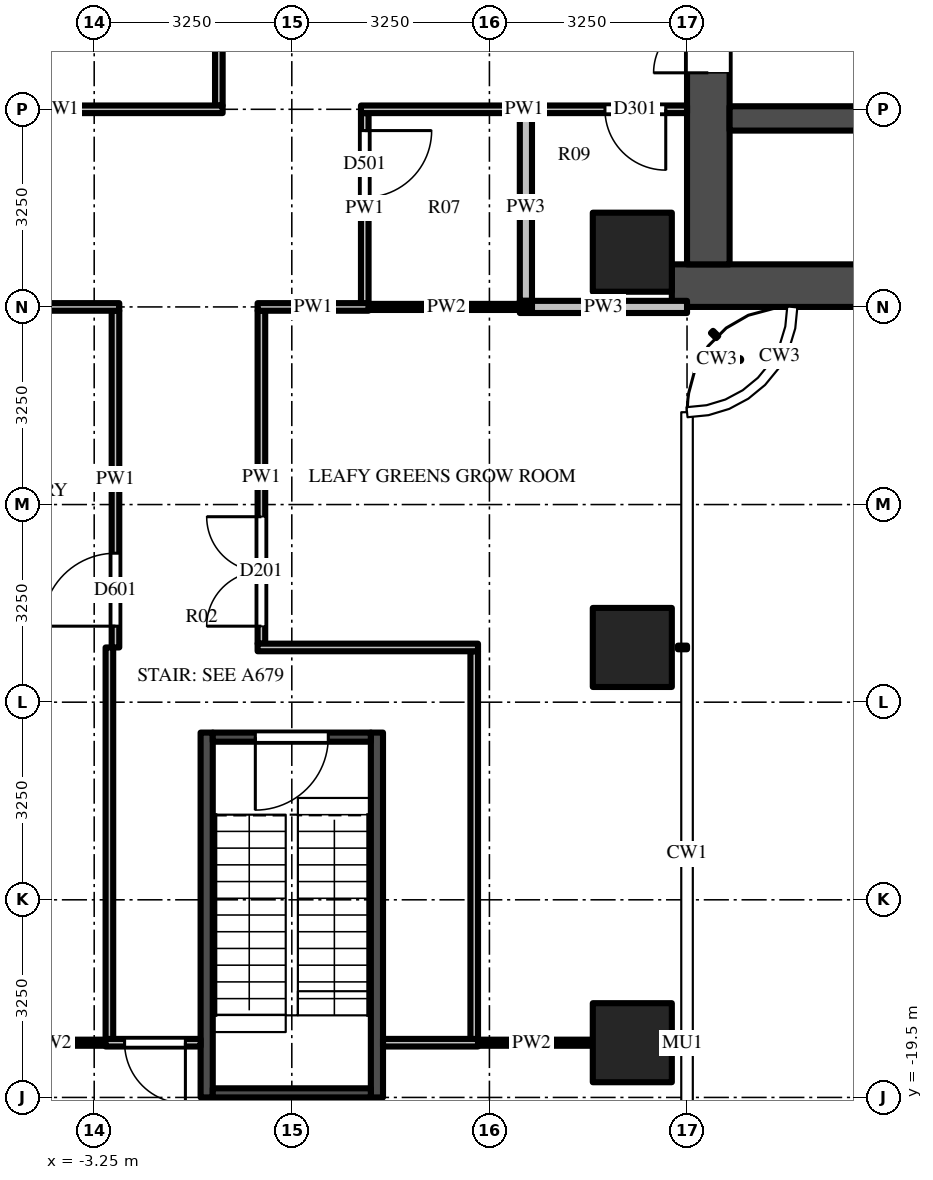
"""IFC4 building model, lengths in metres.
Left out: names, types, materials, properties, quantities, classifications, styles, units other than length and angle.
Written with IfcOpenShell. Run it as: python <this file> out.ifc"""

import sys

from ifc_helpers import new_model, si_unit, direction, frame, frame_2d, origin, origin_2d, place, context, subcontext, project, spatial, rectangle, extrude, source, transform, mapped, element, fill, save


model = new_model("IFC4")
c1 = context("Model", 3, precision=1e-05, world=origin(), true_north=direction((0.0, 1.0)))
c2 = subcontext(c1, "Body", "Model", "MODEL_VIEW")
j1 = project(units=[si_unit("LENGTHUNIT", "METRE"), si_unit("PLANEANGLEUNIT", "RADIAN")], contexts=[c1])
p1 = place(None, origin())
s1 = spatial("IfcSite", under=j1, at=p1, CompositionType="ELEMENT")
p2 = place(p1, origin())
s2 = spatial("IfcBuilding", under=s1, at=p2, CompositionType="ELEMENT")
p3 = place(p2, frame((0.0, 0.0, 129.0)))
s3 = spatial("IfcBuildingStorey", under=s2, at=p3, CompositionType="ELEMENT", Elevation=129.0)
m1 = source(origin(), c2, "Body", "SweptSolid", [
    extrude(rectangle(XDim=1.3, YDim=1.3, at=origin_2d()), origin(), (0.0, 0.0, 1.0), 4.5),
])
for number, where, z_axis, x_axis in (
    (1, (5.6, -5.6, 0.0), (0.0, 0.0, 1.0), (1.0, 0.0, 0.0)),
    (2, (5.6, -12.1, 0.0), (0.0, 0.0, 1.0), (1.0, 0.0, 0.0)),
    (3, (5.6, -18.6, 0.0), (0.0, 0.0, 1.0), (1.0, 0.0, 0.0)),
):
    element("IfcColumn", number, at=place(p3, frame(where, z_axis=z_axis, x_axis=x_axis)), inside=s3, PredefinedType="COLUMN", context=c2, shape_type="MappedRepresentation", body=[
        mapped(m1, transform((0.0, 0.0, 0.0))),
    ])
m2 = source(origin(), c2, "Body", "SweptSolid", [
    extrude(rectangle(XDim=16.5, YDim=0.7, at=frame_2d((8.25, 0.0))), origin(), (0.0, 0.0, 1.0), 4.25),
])
p4 = place(p3, frame((6.25, -6.15, 0.0), z_axis=(0.0, 0.0, 1.0), x_axis=(1.0, 0.0, 0.0)))
e4 = element("IfcWall", 4, at=p4, inside=s3, PredefinedType="SHEAR", context=c2, shape_type="MappedRepresentation", body=[
    mapped(m2, transform((0.0, 0.0, 0.0))),
])
m3 = source(origin(), c2, "Body", "SweptSolid", [
    extrude(rectangle(XDim=9.05, YDim=0.7, at=frame_2d((4.525, 0.0))), origin(), (0.0, 0.0, 1.0), 4.25),
])
p5 = place(p3, frame((6.85, -5.8, 0.0), z_axis=(0.0, 0.0, 1.0), x_axis=(0.0, 1.0, 0.0)))
e5 = element("IfcWall", 5, at=p5, inside=s3, PredefinedType="SHEAR", context=c2, shape_type="MappedRepresentation", body=[
    mapped(m3, transform((0.0, 0.0, 0.0))),
])
m4 = source(origin(), c2, "Body", "SweptSolid", [
    extrude(rectangle(XDim=1.8, YDim=2.1, at=frame_2d((0.9, 1.05))), frame((0.0, 0.36, 0.0), z_axis=(0.0, -1.0, 0.0), x_axis=(1.0, 0.0, 0.0)), (0.0, 0.0, 1.0), 0.72),
])
p6 = place(p5, frame((3.15, 0.0, 0.0)))
e6 = element("IfcOpeningElement", 6, at=p6, cuts=e5, PredefinedType="OPENING", context=c2, shape_type="MappedRepresentation", body=[
    mapped(m4, transform((0.0, 0.0, 0.0))),
])
m5 = source(origin(), c2, "Body", "SweptSolid", [
    extrude(rectangle(XDim=7.5, YDim=0.4, at=frame_2d((3.75, 0.0))), origin(), (0.0, 0.0, 1.0), 4.25),
])
p7 = place(p3, frame((7.2, -3.4, 0.0), z_axis=(0.0, 0.0, 1.0), x_axis=(1.0, 0.0, 0.0)))
e7 = element("IfcWall", 7, at=p7, inside=s3, PredefinedType="SHEAR", context=c2, shape_type="MappedRepresentation", body=[
    mapped(m5, transform((0.0, 0.0, 0.0))),
])
m6 = source(origin(), c2, "Body", "SweptSolid", [
    extrude(rectangle(XDim=1.1, YDim=2.1, at=frame_2d((0.55, 1.05))), frame((0.0, 0.21, 0.0), z_axis=(0.0, -1.0, 0.0), x_axis=(1.0, 0.0, 0.0)), (0.0, 0.0, 1.0), 0.42),
])
p8 = place(p7, frame((3.0, 0.0, 0.0)))
e8 = element("IfcOpeningElement", 8, at=p8, cuts=e7, PredefinedType="OPENING", context=c2, shape_type="MappedRepresentation", body=[
    mapped(m6, transform((0.0, 0.0, 0.0))),
])
p9 = place(p7, frame((5.5, 0.0, 0.0)))
e9 = element("IfcOpeningElement", 9, at=p9, cuts=e7, PredefinedType="OPENING", context=c2, shape_type="MappedRepresentation", body=[
    mapped(m6, transform((0.0, 0.0, 0.0))),
])
m7 = source(origin(), c2, "Body", "SweptSolid", [
    extrude(rectangle(XDim=6.0, YDim=0.2, at=frame_2d((3.0, 0.0))), origin(), (0.0, 0.0, 1.0), 4.25),
])
for number, where, z_axis, x_axis in (
    (10, (1.4, -13.5, 0.0), (0.0, 0.0, 1.0), (0.0, -1.0, 0.0)),
    (11, (-1.4, -13.5, 0.0), (0.0, 0.0, 1.0), (0.0, -1.0, 0.0)),
):
    element("IfcWall", number, at=place(p3, frame(where, z_axis=z_axis, x_axis=x_axis)), inside=s3, PredefinedType="SHEAR", context=c2, shape_type="MappedRepresentation", body=[
        mapped(m7, transform((0.0, 0.0, 0.0))),
    ])
m8 = source(origin(), c2, "Body", "SweptSolid", [
    extrude(rectangle(XDim=2.6, YDim=0.15, at=frame_2d((1.3, 0.0))), origin(), (0.0, 0.0, 1.0), 4.25),
])
p10 = place(p3, frame((1.3, -13.575, 0.0), z_axis=(0.0, 0.0, 1.0), x_axis=(-1.0, 0.0, 0.0)))
e12 = element("IfcWall", 12, at=p10, inside=s3, PredefinedType="SHEAR", context=c2, shape_type="MappedRepresentation", body=[
    mapped(m8, transform((0.0, 0.0, 0.0))),
])
m9 = source(origin(), c2, "Body", "SweptSolid", [
    extrude(rectangle(XDim=1.2, YDim=2.1, at=frame_2d((0.6, 1.05))), frame((0.0, 0.085, 0.0), z_axis=(0.0, -1.0, 0.0), x_axis=(1.0, 0.0, 0.0)), (0.0, 0.0, 1.0), 0.17),
])
p11 = place(p10, frame((0.7, 0.0, 0.0)))
e13 = element("IfcOpeningElement", 13, at=p11, cuts=e12, PredefinedType="OPENING", context=c2, shape_type="MappedRepresentation", body=[
    mapped(m9, transform((0.0, 0.0, 0.0))),
])
p12 = place(p3, frame((1.3, -19.425, 0.0), z_axis=(0.0, 0.0, 1.0), x_axis=(-1.0, 0.0, 0.0)))
e14 = element("IfcWall", 14, at=p12, inside=s3, PredefinedType="SHEAR", context=c2, shape_type="MappedRepresentation", body=[
    mapped(m8, transform((0.0, 0.0, 0.0))),
])
m10 = source(origin(), c2, "Body", "SweptSolid", [
    extrude(rectangle(XDim=6.45, YDim=0.125, at=frame_2d((3.225, 0.0))), origin(), (0.0, 0.0, 1.0), 3.468),
])
p13 = place(p3, frame((-3.0, -18.55, 0.0), z_axis=(0.0, 0.0, 1.0), x_axis=(0.0, 1.0, 0.0)))
e15 = element("IfcWall", 15, at=p13, inside=s3, PredefinedType="PARTITIONING", context=c2, shape_type="MappedRepresentation", body=[
    mapped(m10, transform((0.0, 0.0, 0.0))),
])
m11 = source(origin(), c2, "Body", "SweptSolid", [
    extrude(rectangle(XDim=5.538, YDim=0.125, at=frame_2d((2.769, 0.0))), origin(), (0.0, 0.0, 1.0), 3.468),
])
p14 = place(p3, frame((-2.9, -12.1, 0.0), z_axis=(0.0, 0.0, 1.0), x_axis=(0.0, 1.0, 0.0)))
e16 = element("IfcWall", 16, at=p14, inside=s3, PredefinedType="PARTITIONING", context=c2, shape_type="MappedRepresentation", body=[
    mapped(m11, transform((0.0, 0.0, 0.0))),
])
m12 = source(origin(), c2, "Body", "SweptSolid", [
    extrude(rectangle(XDim=1.2, YDim=2.1, at=frame_2d((0.6, 1.05))), frame((0.0, 0.073, 0.0), z_axis=(0.0, -1.0, 0.0), x_axis=(1.0, 0.0, 0.0)), (0.0, 0.0, 1.0), 0.145),
])
p15 = place(p14, frame((0.35, 0.0, 0.0)))
e17 = element("IfcOpeningElement", 17, at=p15, cuts=e16, PredefinedType="OPENING", context=c2, shape_type="MappedRepresentation", body=[
    mapped(m12, transform((0.0, 0.0, 0.0))),
])
m13 = source(origin(), c2, "Body", "SweptSolid", [
    extrude(rectangle(XDim=3.125, YDim=0.125, at=frame_2d((1.562, 0.0))), origin(), (0.0, 0.0, 1.0), 3.546),
])
p16 = place(p3, frame((-1.2, -0.062, 0.0), z_axis=(0.0, 0.0, 1.0), x_axis=(0.0, -1.0, 0.0)))
e18 = element("IfcWall", 18, at=p16, inside=s3, PredefinedType="PARTITIONING", context=c2, shape_type="MappedRepresentation", body=[
    mapped(m13, transform((0.0, 0.0, 0.0))),
])
m14 = source(origin(), c2, "Body", "SweptSolid", [
    extrude(rectangle(XDim=5.475, YDim=0.125, at=frame_2d((2.738, 0.0))), origin(), (0.0, 0.0, 1.0), 3.468),
])
p17 = place(p3, frame((-0.5, -12.038, 0.0), z_axis=(0.0, 0.0, 1.0), x_axis=(0.0, 1.0, 0.0)))
e19 = element("IfcWall", 19, at=p17, inside=s3, PredefinedType="PARTITIONING", context=c2, shape_type="MappedRepresentation", body=[
    mapped(m14, transform((0.0, 0.0, 0.0))),
])
m15 = source(origin(), c2, "Body", "SweptSolid", [
    extrude(rectangle(XDim=1.8, YDim=2.1, at=frame_2d((0.9, 1.05))), frame((0.0, 0.073, 0.0), z_axis=(0.0, -1.0, 0.0), x_axis=(1.0, 0.0, 0.0)), (0.0, 0.0, 1.0), 0.145),
])
p18 = place(p17, frame((0.288, 0.0, 0.0)))
e20 = element("IfcOpeningElement", 20, at=p18, cuts=e19, PredefinedType="OPENING", context=c2, shape_type="MappedRepresentation", body=[
    mapped(m15, transform((0.0, 0.0, 0.0))),
])
m16 = source(origin(), c2, "Body", "SweptSolid", [
    extrude(rectangle(XDim=3.137, YDim=0.125, at=frame_2d((1.569, 0.0))), origin(), (0.0, 0.0, 1.0), 3.468),
])
p19 = place(p3, frame((1.2, -3.312, 0.0), z_axis=(0.0, 0.0, 1.0), x_axis=(0.0, -1.0, 0.0)))
e21 = element("IfcWall", 21, at=p19, inside=s3, PredefinedType="PARTITIONING", context=c2, shape_type="MappedRepresentation", body=[
    mapped(m16, transform((0.0, 0.0, 0.0))),
])
m17 = source(origin(), c2, "Body", "SweptSolid", [
    extrude(rectangle(XDim=1.1, YDim=2.1, at=frame_2d((0.55, 1.05))), frame((0.0, 0.073, 0.0), z_axis=(0.0, -1.0, 0.0), x_axis=(1.0, 0.0, 0.0)), (0.0, 0.0, 1.0), 0.145),
])
p20 = place(p19, frame((0.288, 0.0, 0.0)))
e22 = element("IfcOpeningElement", 22, at=p20, cuts=e21, PredefinedType="OPENING", context=c2, shape_type="MappedRepresentation", body=[
    mapped(m17, transform((0.0, 0.0, 0.0))),
])
m18 = source(origin(), c2, "Body", "SweptSolid", [
    extrude(rectangle(XDim=6.387, YDim=0.125, at=frame_2d((3.194, 0.0))), origin(), (0.0, 0.0, 1.0), 3.468),
])
p21 = place(p3, frame((3.0, -12.163, 0.0), z_axis=(0.0, 0.0, 1.0), x_axis=(0.0, -1.0, 0.0)))
e23 = element("IfcWall", 23, at=p21, inside=s3, PredefinedType="PARTITIONING", context=c2, shape_type="MappedRepresentation", body=[
    mapped(m18, transform((0.0, 0.0, 0.0))),
])
m19 = source(origin(), c2, "Body", "SweptSolid", [
    extrude(rectangle(XDim=3.087, YDim=0.2, at=frame_2d((1.544, 0.0))), origin(), (0.0, 0.0, 1.0), 3.468),
])
p22 = place(p3, frame((3.85, -6.4, 0.0), z_axis=(0.0, 0.0, 1.0), x_axis=(0.0, 1.0, 0.0)))
e24 = element("IfcWall", 24, at=p22, inside=s3, PredefinedType="PARTITIONING", context=c2, shape_type="MappedRepresentation", body=[
    mapped(m19, transform((0.0, 0.0, 0.0))),
])
m20 = source(origin(), c2, "Body", "SweptSolid", [
    extrude(rectangle(XDim=2.012, YDim=0.1, at=frame_2d((1.006, 0.0))), origin(), (0.0, 0.0, 1.0), 3.697),
])
for number, where, z_axis, x_axis in (
    (25, (-4.95, -18.6, 0.0), (0.0, 0.0, 1.0), (1.0, 0.0, 0.0)),
    (26, (2.938, -18.6, 0.0), (0.0, 0.0, 1.0), (1.0, 0.0, 0.0)),
):
    element("IfcWall", number, at=place(p3, frame(where, z_axis=z_axis, x_axis=x_axis)), inside=s3, PredefinedType="PARTITIONING", context=c2, shape_type="MappedRepresentation", body=[
        mapped(m20, transform((0.0, 0.0, 0.0))),
    ])
m21 = source(origin(), c2, "Body", "SweptSolid", [
    extrude(rectangle(XDim=1.562, YDim=0.125, at=frame_2d((0.781, 0.0))), origin(), (0.0, 0.0, 1.0), 3.697),
])
p23 = place(p3, frame((-1.5, -18.6, 0.0), z_axis=(0.0, 0.0, 1.0), x_axis=(-1.0, 0.0, 0.0)))
e27 = element("IfcWall", 27, at=p23, inside=s3, PredefinedType="PARTITIONING", context=c2, shape_type="MappedRepresentation", body=[
    mapped(m21, transform((0.0, 0.0, 0.0))),
])
m22 = source(origin(), c2, "Body", "SweptSolid", [
    extrude(rectangle(XDim=1.0, YDim=2.1, at=frame_2d((0.5, 1.05))), frame((0.0, 0.073, 0.0), z_axis=(0.0, -1.0, 0.0), x_axis=(1.0, 0.0, 0.0)), (0.0, 0.0, 1.0), 0.145),
])
p24 = place(p23, frame((0.25, 0.0, 0.0)))
e28 = element("IfcOpeningElement", 28, at=p24, cuts=e27, PredefinedType="OPENING", context=c2, shape_type="MappedRepresentation", body=[
    mapped(m22, transform((0.0, 0.0, 0.0))),
])
p25 = place(p3, frame((3.062, -18.6, 0.0), z_axis=(0.0, 0.0, 1.0), x_axis=(-1.0, 0.0, 0.0)))
e29 = element("IfcWall", 29, at=p25, inside=s3, PredefinedType="PARTITIONING", context=c2, shape_type="MappedRepresentation", body=[
    mapped(m21, transform((0.0, 0.0, 0.0))),
])
m23 = source(origin(), c2, "Body", "SweptSolid", [
    extrude(rectangle(XDim=3.625, YDim=0.125, at=frame_2d((1.812, 0.0))), origin(), (0.0, 0.0, 1.0), 3.468),
])
p26 = place(p3, frame((-0.562, -12.1, 0.0), z_axis=(0.0, 0.0, 1.0), x_axis=(1.0, 0.0, 0.0)))
e30 = element("IfcWall", 30, at=p26, inside=s3, PredefinedType="PARTITIONING", context=c2, shape_type="MappedRepresentation", body=[
    mapped(m23, transform((0.0, 0.0, 0.0))),
])
m24 = source(origin(), c2, "Body", "SweptSolid", [
    extrude(rectangle(XDim=2.75, YDim=0.2, at=frame_2d((1.375, 0.0))), origin(), (0.0, 0.0, 1.0), 3.33),
])
p27 = place(p3, frame((3.75, -6.5, 0.0), z_axis=(0.0, 0.0, 1.0), x_axis=(1.0, 0.0, 0.0)))
e31 = element("IfcWall", 31, at=p27, inside=s3, PredefinedType="PARTITIONING", context=c2, shape_type="MappedRepresentation", body=[
    mapped(m24, transform((0.0, 0.0, 0.0))),
])
m25 = source(origin(), c2, "Body", "SweptSolid", [
    extrude(rectangle(XDim=2.812, YDim=0.1, at=frame_2d((1.406, 0.0))), origin(), (0.0, 0.0, 1.0), 4.25),
])
p28 = place(p3, frame((1.137, -6.5, 0.0), z_axis=(0.0, 0.0, 1.0), x_axis=(1.0, 0.0, 0.0)))
e32 = element("IfcWall", 32, at=p28, inside=s3, PredefinedType="PARTITIONING", context=c2, shape_type="MappedRepresentation", body=[
    mapped(m25, transform((0.0, 0.0, 0.0))),
])
m26 = source(origin(), c2, "Body", "SweptSolid", [
    extrude(rectangle(XDim=3.725, YDim=0.125, at=frame_2d((1.863, 0.0))), origin(), (0.0, 0.0, 1.0), 3.33),
])
p29 = place(p3, frame((-2.837, -6.5, 0.0), z_axis=(0.0, 0.0, 1.0), x_axis=(-1.0, 0.0, 0.0)))
e33 = element("IfcWall", 33, at=p29, inside=s3, PredefinedType="PARTITIONING", context=c2, shape_type="MappedRepresentation", body=[
    mapped(m26, transform((0.0, 0.0, 0.0))),
])
m27 = source(origin(), c2, "Body", "SweptSolid", [
    extrude(rectangle(XDim=1.825, YDim=0.125, at=frame_2d((0.913, 0.0))), origin(), (0.0, 0.0, 1.0), 4.25),
])
p30 = place(p3, frame((1.262, -6.5, 0.0), z_axis=(0.0, 0.0, 1.0), x_axis=(-1.0, 0.0, 0.0)))
e34 = element("IfcWall", 34, at=p30, inside=s3, PredefinedType="PARTITIONING", context=c2, shape_type="MappedRepresentation", body=[
    mapped(m27, transform((0.0, 0.0, 0.0))),
])
m28 = source(origin(), c2, "Body", "SweptSolid", [
    extrude(rectangle(XDim=5.363, YDim=0.125, at=frame_2d((2.681, 0.0))), origin(), (0.0, 0.0, 1.0), 3.468),
])
p31 = place(p3, frame((-1.137, -3.25, 0.0), z_axis=(0.0, 0.0, 1.0), x_axis=(-1.0, 0.0, 0.0)))
e35 = element("IfcWall", 35, at=p31, inside=s3, PredefinedType="PARTITIONING", context=c2, shape_type="MappedRepresentation", body=[
    mapped(m28, transform((0.0, 0.0, 0.0))),
])
p32 = place(p31, frame((4.012, 0.0, 0.0)))
e36 = element("IfcOpeningElement", 36, at=p32, cuts=e35, PredefinedType="OPENING", context=c2, shape_type="MappedRepresentation", body=[
    mapped(m22, transform((0.0, 0.0, 0.0))),
])
p33 = place(p3, frame((6.5, -3.25, 0.0), z_axis=(0.0, 0.0, 1.0), x_axis=(-1.0, 0.0, 0.0)))
e37 = element("IfcWall", 37, at=p33, inside=s3, PredefinedType="PARTITIONING", context=c2, shape_type="MappedRepresentation", body=[
    mapped(m28, transform((0.0, 0.0, 0.0))),
])
p34 = place(p33, frame((0.35, 0.0, 0.0)))
e38 = element("IfcOpeningElement", 38, at=p34, cuts=e37, PredefinedType="OPENING", context=c2, shape_type="MappedRepresentation", body=[
    mapped(m22, transform((0.0, 0.0, 0.0))),
])
m29 = source(origin(), c2, "Body", "SweptSolid", [
    extrude(rectangle(XDim=1.8, YDim=2.1, at=frame_2d((0.9, 1.05))), frame((0.0, -0.275, 0.0), z_axis=(0.0, -1.0, 0.0), x_axis=(1.0, 0.0, 0.0)), (0.0, 0.0, 1.0), 0.05),
])
p35 = place(p6, origin())
e39 = element("IfcDoor", 39, at=p35, inside=s3, OperationType="DOUBLE_DOOR_SINGLE_SWING", PredefinedType="DOOR", context=c2, shape_type="MappedRepresentation", body=[
    mapped(m29, transform((0.0, 0.0, 0.0))),
])
fill(e6, e39)
m30 = source(origin(), c2, "Body", "SweptSolid", [
    extrude(rectangle(XDim=1.2, YDim=2.1, at=frame_2d((0.6, 1.05))), frame((0.0, 0.025, 0.0), z_axis=(0.0, -1.0, 0.0), x_axis=(1.0, 0.0, 0.0)), (0.0, 0.0, 1.0), 0.05),
])
p36 = place(p11, origin())
e40 = element("IfcDoor", 40, at=p36, inside=s3, OperationType="SINGLE_SWING_RIGHT", PredefinedType="DOOR", context=c2, shape_type="MappedRepresentation", body=[
    mapped(m30, transform((0.0, 0.0, 0.0))),
])
fill(e13, e40)
m31 = source(origin(), c2, "Body", "SweptSolid", [
    extrude(rectangle(XDim=1.0, YDim=2.1, at=frame_2d((0.5, 1.05))), frame((0.0, 0.025, 0.0), z_axis=(0.0, -1.0, 0.0), x_axis=(1.0, 0.0, 0.0)), (0.0, 0.0, 1.0), 0.05),
])
p37 = place(p24, origin())
e41 = element("IfcDoor", 41, at=p37, inside=s3, OperationType="SINGLE_SWING_LEFT", PredefinedType="DOOR", context=c2, shape_type="MappedRepresentation", body=[
    mapped(m31, transform((0.0, 0.0, 0.0))),
])
fill(e28, e41)
p38 = place(p15, origin())
e42 = element("IfcDoor", 42, at=p38, inside=s3, OperationType="SINGLE_SWING_LEFT", PredefinedType="DOOR", context=c2, shape_type="MappedRepresentation", body=[
    mapped(m30, transform((0.0, 0.0, 0.0))),
])
fill(e17, e42)
m32 = source(origin(), c2, "Body", "SweptSolid", [
    extrude(rectangle(XDim=1.8, YDim=2.1, at=frame_2d((0.9, 1.05))), frame((0.0, 0.025, 0.0), z_axis=(0.0, -1.0, 0.0), x_axis=(1.0, 0.0, 0.0)), (0.0, 0.0, 1.0), 0.05),
])
p39 = place(p18, origin())
e43 = element("IfcDoor", 43, at=p39, inside=s3, OperationType="DOUBLE_DOOR_SINGLE_SWING", PredefinedType="DOOR", context=c2, shape_type="MappedRepresentation", body=[
    mapped(m32, transform((0.0, 0.0, 0.0))),
])
fill(e20, e43)
m33 = source(origin(), c2, "Body", "SweptSolid", [
    extrude(rectangle(XDim=1.1, YDim=2.1, at=frame_2d((0.55, 1.05))), frame((0.0, 0.025, 0.0), z_axis=(0.0, -1.0, 0.0), x_axis=(1.0, 0.0, 0.0)), (0.0, 0.0, 1.0), 0.05),
])
p40 = place(p20, origin())
e44 = element("IfcDoor", 44, at=p40, inside=s3, OperationType="SINGLE_SWING_LEFT", PredefinedType="DOOR", context=c2, shape_type="MappedRepresentation", body=[
    mapped(m33, transform((0.0, 0.0, 0.0))),
])
fill(e22, e44)
p41 = place(p34, origin())
e45 = element("IfcDoor", 45, at=p41, inside=s3, OperationType="SINGLE_SWING_LEFT", PredefinedType="DOOR", context=c2, shape_type="MappedRepresentation", body=[
    mapped(m31, transform((0.0, 0.0, 0.0))),
])
fill(e38, e45)
save(model, sys.argv[1])
